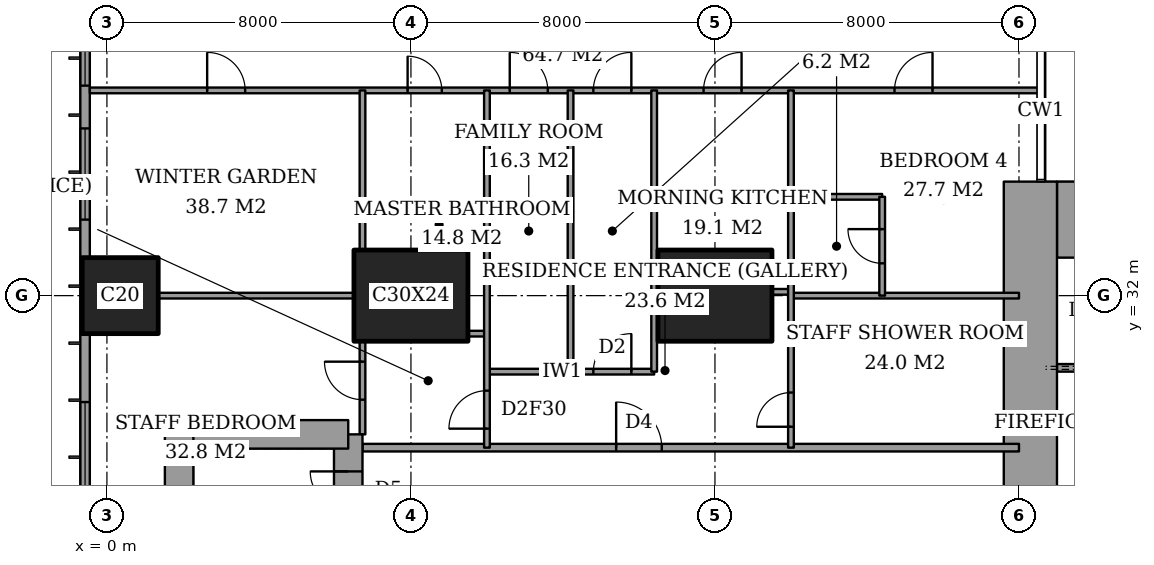
"""IFC4 building model, lengths in metres.
Left out: names, types, materials, properties, quantities, classifications, styles, units other than length and angle.
Written with IfcOpenShell. Run it as: python <this file> out.ifc"""

import sys

from ifc_helpers import new_model, si_unit, direction, frame, frame_2d, origin, origin_2d, place, context, subcontext, project, spatial, rectangle, extrude, element, fill, save


model = new_model("IFC4")
c1 = context("Model", 3, precision=1e-05, world=origin(), true_north=direction((0.0, 1.0)))
c2 = subcontext(c1, "Body", "Model", "MODEL_VIEW")
j1 = project(units=[si_unit("LENGTHUNIT", "METRE"), si_unit("PLANEANGLEUNIT", "RADIAN")], contexts=[c1])
p1 = place(None, origin())
s1 = spatial("IfcSite", under=j1, at=p1, CompositionType="ELEMENT")
p2 = place(p1, origin())
s2 = spatial("IfcBuilding", under=s1, at=p2, CompositionType="ELEMENT")
p3 = place(p2, frame((0.0, 0.0, 103.4)))
s3 = spatial("IfcBuildingStorey", under=s2, at=p3, CompositionType="ELEMENT", Elevation=103.4)
p4 = place(p3, frame((0.35, 32.0, 0.0), z_axis=(0.0, 0.0, 1.0), x_axis=(1.0, 0.0, 0.0)))
e1 = element("IfcColumn", 1, at=p4, inside=s3, PredefinedType="COLUMN", context=c2, shape_type="SweptSolid", body=[
    extrude(rectangle(XDim=2.0, YDim=2.0, at=origin_2d()), origin(), (0.0, 0.0, 1.0), 3.6),
])
for number, where, z_axis, x_axis in (
    (2, (8.0, 32.0, 0.0), (0.0, 0.0, 1.0), (1.0, 0.0, 0.0)),
    (3, (16.0, 32.0, 0.0), (0.0, 0.0, 1.0), (1.0, 0.0, 0.0)),
):
    element("IfcColumn", number, at=place(p3, frame(where, z_axis=z_axis, x_axis=x_axis)), inside=s3, PredefinedType="COLUMN", context=c2, shape_type="SweptSolid", body=[
        extrude(rectangle(XDim=3.0, YDim=2.4, at=origin_2d()), origin(), (0.0, 0.0, 1.0), 3.6),
    ])
p5 = place(p3, frame((25.0, 34.0, 0.0), z_axis=(0.0, 0.0, 1.0), x_axis=(1.0, 0.0, 0.0)))
e4 = element("IfcWall", 4, at=p5, inside=s3, PredefinedType="SHEAR", context=c2, shape_type="SweptSolid", body=[
    extrude(rectangle(XDim=3.15, YDim=2.0, at=frame_2d((1.575, 0.0))), origin(), (0.0, 0.0, 1.0), 3.6),
])
p6 = place(p3, frame((24.3, 23.15, 0.0), z_axis=(0.0, 0.0, 1.0), x_axis=(0.0, 1.0, 0.0)))
e5 = element("IfcWall", 5, at=p6, inside=s3, PredefinedType="SHEAR", context=c2, shape_type="SweptSolid", body=[
    extrude(rectangle(XDim=11.85, YDim=1.4, at=frame_2d((5.925, 0.0))), origin(), (0.0, 0.0, 1.0), 3.6),
])
p7 = place(p6, frame((0.75, 0.0, 0.0)))
e6 = element("IfcOpeningElement", 6, at=p7, cuts=e5, PredefinedType="OPENING", context=c2, shape_type="SweptSolid", body=[
    extrude(rectangle(XDim=1.8, YDim=2.4, at=frame_2d((0.9, 1.2))), frame((0.0, 0.71, 0.0), z_axis=(0.0, -1.0, 0.0), x_axis=(1.0, 0.0, 0.0)), (0.0, 0.0, 1.0), 1.42),
])
p8 = place(p3, frame((6.35, 19.65, 0.0), z_axis=(0.0, 0.0, 1.0), x_axis=(0.0, 1.0, 0.0)))
e7 = element("IfcWall", 7, at=p8, inside=s3, PredefinedType="SHEAR", context=c2, shape_type="SweptSolid", body=[
    extrude(rectangle(XDim=8.7, YDim=0.75, at=frame_2d((4.35, 0.0))), origin(), (0.0, 0.0, 1.0), 3.6),
])
p9 = place(p8, frame((6.725, 0.0, 0.0)))
e8 = element("IfcOpeningElement", 8, at=p9, cuts=e7, PredefinedType="OPENING", context=c2, shape_type="SweptSolid", body=[
    extrude(rectangle(XDim=1.0, YDim=2.1, at=frame_2d((0.5, 1.05))), frame((0.0, 0.385, 0.0), z_axis=(0.0, -1.0, 0.0), x_axis=(1.0, 0.0, 0.0)), (0.0, 0.0, 1.0), 0.77),
])
p10 = place(p3, frame((6.35, 28.35, 0.0), z_axis=(0.0, 0.0, 1.0), x_axis=(-1.0, 0.0, 0.0)))
e9 = element("IfcWall", 9, at=p10, inside=s3, PredefinedType="SHEAR", context=c2, shape_type="SweptSolid", body=[
    extrude(rectangle(XDim=4.45, YDim=0.75, at=frame_2d((2.225, 0.0))), origin(), (0.0, 0.0, 1.0), 3.6),
])
p11 = place(p3, frame((1.9, 28.35, 0.0), z_axis=(0.0, 0.0, 1.0), x_axis=(0.0, -1.0, 0.0)))
e10 = element("IfcWall", 10, at=p11, inside=s3, PredefinedType="SHEAR", context=c2, shape_type="SweptSolid", body=[
    extrude(rectangle(XDim=8.7, YDim=0.75, at=frame_2d((4.35, 0.0))), origin(), (0.0, 0.0, 1.0), 3.6),
])
p12 = place(p3, frame((-0.575, 44.825, 0.0), z_axis=(0.0, 0.0, 1.0), x_axis=(0.0, -1.0, 0.0)))
e11 = element("IfcWall", 11, at=p12, inside=s3, PredefinedType="SOLIDWALL", context=c2, shape_type="SweptSolid", body=[
    extrude(rectangle(XDim=41.65, YDim=0.25, at=frame_2d((20.825, 0.0))), origin(), (0.0, 0.0, 1.0), 3.6),
])
p13 = place(p12, frame((0.775, 0.0, 0.4)))
e12 = element("IfcOpeningElement", 12, at=p13, cuts=e11, PredefinedType="OPENING", context=c2, shape_type="SweptSolid", body=[
    extrude(rectangle(XDim=2.4, YDim=2.2, at=frame_2d((1.2, 1.1))), frame((0.0, 0.135, 0.0), z_axis=(0.0, -1.0, 0.0), x_axis=(1.0, 0.0, 0.0)), (0.0, 0.0, 1.0), 0.27),
])
p14 = place(p12, frame((6.1, 0.0, 0.4)))
e13 = element("IfcOpeningElement", 13, at=p14, cuts=e11, PredefinedType="OPENING", context=c2, shape_type="SweptSolid", body=[
    extrude(rectangle(XDim=1.2, YDim=2.2, at=frame_2d((0.6, 1.1))), frame((0.0, 0.135, 0.0), z_axis=(0.0, -1.0, 0.0), x_axis=(1.0, 0.0, 0.0)), (0.0, 0.0, 1.0), 0.27),
])
p15 = place(p12, frame((8.425, 0.0, 0.4)))
e14 = element("IfcOpeningElement", 14, at=p15, cuts=e11, PredefinedType="OPENING", context=c2, shape_type="SweptSolid", body=[
    extrude(rectangle(XDim=2.4, YDim=2.2, at=frame_2d((1.2, 1.1))), frame((0.0, 0.135, 0.0), z_axis=(0.0, -1.0, 0.0), x_axis=(1.0, 0.0, 0.0)), (0.0, 0.0, 1.0), 0.27),
])
p16 = place(p12, frame((15.625, 0.0, 0.4)))
e15 = element("IfcOpeningElement", 15, at=p16, cuts=e11, PredefinedType="OPENING", context=c2, shape_type="SweptSolid", body=[
    extrude(rectangle(XDim=2.4, YDim=2.2, at=frame_2d((1.2, 1.1))), frame((0.0, 0.135, 0.0), z_axis=(0.0, -1.0, 0.0), x_axis=(1.0, 0.0, 0.0)), (0.0, 0.0, 1.0), 0.27),
])
p17 = place(p12, frame((23.625, 0.0, 0.4)))
e16 = element("IfcOpeningElement", 16, at=p17, cuts=e11, PredefinedType="OPENING", context=c2, shape_type="SweptSolid", body=[
    extrude(rectangle(XDim=2.4, YDim=2.2, at=frame_2d((1.2, 1.1))), frame((0.0, 0.135, 0.0), z_axis=(0.0, -1.0, 0.0), x_axis=(1.0, 0.0, 0.0)), (0.0, 0.0, 1.0), 0.27),
])
p18 = place(p12, frame((30.725, 0.0, 0.4)))
e17 = element("IfcOpeningElement", 17, at=p18, cuts=e11, PredefinedType="OPENING", context=c2, shape_type="SweptSolid", body=[
    extrude(rectangle(XDim=2.4, YDim=2.2, at=frame_2d((1.2, 1.1))), frame((0.0, 0.135, 0.0), z_axis=(0.0, -1.0, 0.0), x_axis=(1.0, 0.0, 0.0)), (0.0, 0.0, 1.0), 0.27),
])
p19 = place(p12, frame((34.325, 0.0, 0.4)))
e18 = element("IfcOpeningElement", 18, at=p19, cuts=e11, PredefinedType="OPENING", context=c2, shape_type="SweptSolid", body=[
    extrude(rectangle(XDim=1.2, YDim=2.2, at=frame_2d((0.6, 1.1))), frame((0.0, 0.135, 0.0), z_axis=(0.0, -1.0, 0.0), x_axis=(1.0, 0.0, 0.0)), (0.0, 0.0, 1.0), 0.27),
])
p20 = place(p12, frame((38.475, 0.0, 0.4)))
e19 = element("IfcOpeningElement", 19, at=p20, cuts=e11, PredefinedType="OPENING", context=c2, shape_type="SweptSolid", body=[
    extrude(rectangle(XDim=2.4, YDim=2.2, at=frame_2d((1.2, 1.1))), frame((0.0, 0.135, 0.0), z_axis=(0.0, -1.0, 0.0), x_axis=(1.0, 0.0, 0.0)), (0.0, 0.0, 1.0), 0.27),
])
p21 = place(p3, frame((6.725, 28.0, 0.0), z_axis=(0.0, 0.0, 1.0), x_axis=(1.0, 0.0, 0.0)))
e20 = element("IfcWall", 20, at=p21, inside=s3, PredefinedType="PARTITIONING", context=c2, shape_type="SweptSolid", body=[
    extrude(rectangle(XDim=17.275, YDim=0.2, at=frame_2d((8.637, 0.0))), origin(), (0.0, 0.0, 1.0), 3.35),
])
p22 = place(p21, frame((6.675, 0.0, 0.0)))
e21 = element("IfcOpeningElement", 21, at=p22, cuts=e20, PredefinedType="OPENING", context=c2, shape_type="SweptSolid", body=[
    extrude(rectangle(XDim=1.2, YDim=2.4, at=frame_2d((0.6, 1.2))), frame((0.0, 0.11, 0.0), z_axis=(0.0, -1.0, 0.0), x_axis=(1.0, 0.0, 0.0)), (0.0, 0.0, 1.0), 0.22),
])
p23 = place(p3, frame((10.0, 30.0, 0.0), z_axis=(0.0, 0.0, 1.0), x_axis=(1.0, 0.0, 0.0)))
e22 = element("IfcWall", 22, at=p23, inside=s3, PredefinedType="PARTITIONING", context=c2, shape_type="SweptSolid", body=[
    extrude(rectangle(XDim=4.4, YDim=0.15, at=frame_2d((2.2, 0.0))), origin(), (0.0, 0.0, 1.0), 3.35),
])
p24 = place(p23, frame((2.8, 0.0, 0.0)))
e23 = element("IfcOpeningElement", 23, at=p24, cuts=e22, PredefinedType="OPENING", context=c2, shape_type="SweptSolid", body=[
    extrude(rectangle(XDim=1.0, YDim=2.1, at=frame_2d((0.5, 1.05))), frame((0.0, 0.085, 0.0), z_axis=(0.0, -1.0, 0.0), x_axis=(1.0, 0.0, 0.0)), (0.0, 0.0, 1.0), 0.17),
])
p25 = place(p3, frame((9.5, 31.0, 0.0), z_axis=(0.0, 0.0, 1.0), x_axis=(1.0, 0.0, 0.0)))
e24 = element("IfcWall", 24, at=p25, inside=s3, PredefinedType="PARTITIONING", context=c2, shape_type="SweptSolid", body=[
    extrude(rectangle(XDim=0.5, YDim=0.15, at=frame_2d((0.25, 0.0))), origin(), (0.0, 0.0, 1.0), 3.35),
])
p26 = place(p3, frame((1.35, 32.0, 0.0), z_axis=(0.0, 0.0, 1.0), x_axis=(1.0, 0.0, 0.0)))
e25 = element("IfcWall", 25, at=p26, inside=s3, PredefinedType="PARTITIONING", context=c2, shape_type="SweptSolid", body=[
    extrude(rectangle(XDim=5.15, YDim=0.15, at=frame_2d((2.575, 0.0))), origin(), (0.0, 0.0, 1.0), 2.634),
])
p27 = place(p3, frame((18.0, 32.0, 0.0), z_axis=(0.0, 0.0, 1.0), x_axis=(1.0, 0.0, 0.0)))
e26 = element("IfcWall", 26, at=p27, inside=s3, PredefinedType="PARTITIONING", context=c2, shape_type="SweptSolid", body=[
    extrude(rectangle(XDim=6.0, YDim=0.15, at=frame_2d((3.0, 0.0))), origin(), (0.0, 0.0, 1.0), 2.634),
])
p28 = place(p3, frame((17.5, 32.1, 0.0), z_axis=(0.0, 0.0, 1.0), x_axis=(1.0, 0.0, 0.0)))
e27 = element("IfcWall", 27, at=p28, inside=s3, PredefinedType="PARTITIONING", context=c2, shape_type="SweptSolid", body=[
    extrude(rectangle(XDim=0.5, YDim=0.15, at=frame_2d((0.25, 0.0))), origin(), (0.0, 0.0, 1.0), 2.634),
])
p29 = place(p3, frame((18.0, 34.6, 0.0), z_axis=(0.0, 0.0, 1.0), x_axis=(1.0, 0.0, 0.0)))
e28 = element("IfcWall", 28, at=p29, inside=s3, PredefinedType="PARTITIONING", context=c2, shape_type="SweptSolid", body=[
    extrude(rectangle(XDim=2.4, YDim=0.15, at=frame_2d((1.2, 0.0))), origin(), (0.0, 0.0, 1.0), 3.35),
])
p30 = place(p3, frame((-0.45, 37.4, 0.0), z_axis=(0.0, 0.0, 1.0), x_axis=(1.0, 0.0, 0.0)))
e29 = element("IfcWall", 29, at=p30, inside=s3, PredefinedType="PARTITIONING", context=c2, shape_type="SweptSolid", body=[
    extrude(rectangle(XDim=25.011, YDim=0.15, at=frame_2d((12.505, 0.0))), origin(), (0.0, 0.0, 1.0), 3.35),
])
p31 = place(p30, frame((13.25, 0.0, 0.0)))
e30 = element("IfcOpeningElement", 30, at=p31, cuts=e29, PredefinedType="OPENING", context=c2, shape_type="SweptSolid", body=[
    extrude(rectangle(XDim=1.0, YDim=2.1, at=frame_2d((0.5, 1.05))), frame((0.0, 0.085, 0.0), z_axis=(0.0, -1.0, 0.0), x_axis=(1.0, 0.0, 0.0)), (0.0, 0.0, 1.0), 0.17),
])
p32 = place(p30, frame((3.087, 0.0, 0.0)))
e31 = element("IfcOpeningElement", 31, at=p32, cuts=e29, PredefinedType="OPENING", context=c2, shape_type="SweptSolid", body=[
    extrude(rectangle(XDim=1.0, YDim=2.1, at=frame_2d((0.5, 1.05))), frame((0.0, 0.085, 0.0), z_axis=(0.0, -1.0, 0.0), x_axis=(1.0, 0.0, 0.0)), (0.0, 0.0, 1.0), 0.17),
])
p33 = place(p30, frame((8.363, 0.0, 0.0)))
e32 = element("IfcOpeningElement", 32, at=p33, cuts=e29, PredefinedType="OPENING", context=c2, shape_type="SweptSolid", body=[
    extrude(rectangle(XDim=0.9, YDim=2.1, at=frame_2d((0.45, 1.05))), frame((0.0, 0.085, 0.0), z_axis=(0.0, -1.0, 0.0), x_axis=(1.0, 0.0, 0.0)), (0.0, 0.0, 1.0), 0.17),
])
p34 = place(p30, frame((11.05, 0.0, 0.0)))
e33 = element("IfcOpeningElement", 33, at=p34, cuts=e29, PredefinedType="OPENING", context=c2, shape_type="SweptSolid", body=[
    extrude(rectangle(XDim=1.0, YDim=2.1, at=frame_2d((0.5, 1.05))), frame((0.0, 0.085, 0.0), z_axis=(0.0, -1.0, 0.0), x_axis=(1.0, 0.0, 0.0)), (0.0, 0.0, 1.0), 0.17),
])
p35 = place(p30, frame((16.15, 0.0, 0.0)))
e34 = element("IfcOpeningElement", 34, at=p35, cuts=e29, PredefinedType="OPENING", context=c2, shape_type="SweptSolid", body=[
    extrude(rectangle(XDim=1.0, YDim=2.1, at=frame_2d((0.5, 1.05))), frame((0.0, 0.085, 0.0), z_axis=(0.0, -1.0, 0.0), x_axis=(1.0, 0.0, 0.0)), (0.0, 0.0, 1.0), 0.17),
])
p36 = place(p30, frame((21.175, 0.0, 0.0)))
e35 = element("IfcOpeningElement", 35, at=p36, cuts=e29, PredefinedType="OPENING", context=c2, shape_type="SweptSolid", body=[
    extrude(rectangle(XDim=1.0, YDim=2.1, at=frame_2d((0.5, 1.05))), frame((0.0, 0.085, 0.0), z_axis=(0.0, -1.0, 0.0), x_axis=(1.0, 0.0, 0.0)), (0.0, 0.0, 1.0), 0.17),
])
p37 = place(p3, frame((6.725, 28.35, 0.0), z_axis=(0.0, 0.0, 1.0), x_axis=(0.0, 1.0, 0.0)))
e36 = element("IfcWall", 36, at=p37, inside=s3, PredefinedType="PARTITIONING", context=c2, shape_type="SweptSolid", body=[
    extrude(rectangle(XDim=2.45, YDim=0.15, at=frame_2d((1.225, 0.0))), origin(), (0.0, 0.0, 1.0), 3.35),
])
p38 = place(p37, frame((0.913, 0.0, 0.0)))
e37 = element("IfcOpeningElement", 37, at=p38, cuts=e36, PredefinedType="OPENING", context=c2, shape_type="SweptSolid", body=[
    extrude(rectangle(XDim=1.0, YDim=2.1, at=frame_2d((0.5, 1.05))), frame((0.0, 0.085, 0.0), z_axis=(0.0, -1.0, 0.0), x_axis=(1.0, 0.0, 0.0)), (0.0, 0.0, 1.0), 0.17),
])
p39 = place(p3, frame((6.725, 33.2, 0.0), z_axis=(0.0, 0.0, 1.0), x_axis=(0.0, 1.0, 0.0)))
e38 = element("IfcWall", 38, at=p39, inside=s3, PredefinedType="PARTITIONING", context=c2, shape_type="SweptSolid", body=[
    extrude(rectangle(XDim=4.2, YDim=0.15, at=frame_2d((2.1, 0.0))), origin(), (0.0, 0.0, 1.0), 3.35),
])
p40 = place(p3, frame((10.0, 28.0, 0.0), z_axis=(0.0, 0.0, 1.0), x_axis=(0.0, 1.0, 0.0)))
e39 = element("IfcWall", 39, at=p40, inside=s3, PredefinedType="PARTITIONING", context=c2, shape_type="SweptSolid", body=[
    extrude(rectangle(XDim=9.4, YDim=0.15, at=frame_2d((4.7, 0.0))), origin(), (0.0, 0.0, 1.0), 3.35),
])
p41 = place(p40, frame((0.5, 0.0, 0.0)))
e40 = element("IfcOpeningElement", 40, at=p41, cuts=e39, PredefinedType="OPENING", context=c2, shape_type="SweptSolid", body=[
    extrude(rectangle(XDim=1.0, YDim=2.1, at=frame_2d((0.5, 1.05))), frame((0.0, 0.085, 0.0), z_axis=(0.0, -1.0, 0.0), x_axis=(1.0, 0.0, 0.0)), (0.0, 0.0, 1.0), 0.17),
])
for number, where, z_axis, x_axis in (
    (41, (12.2, 30.0, 0.0), (0.0, 0.0, 1.0), (0.0, 1.0, 0.0)),
    (42, (14.4, 30.0, 0.0), (0.0, 0.0, 1.0), (0.0, 1.0, 0.0)),
):
    element("IfcWall", number, at=place(p3, frame(where, z_axis=z_axis, x_axis=x_axis)), inside=s3, PredefinedType="PARTITIONING", context=c2, shape_type="SweptSolid", body=[
        extrude(rectangle(XDim=7.4, YDim=0.15, at=frame_2d((3.7, 0.0))), origin(), (0.0, 0.0, 1.0), 3.35),
    ])
p42 = place(p3, frame((18.0, 28.0, 0.0), z_axis=(0.0, 0.0, 1.0), x_axis=(0.0, 1.0, 0.0)))
e43 = element("IfcWall", 43, at=p42, inside=s3, PredefinedType="PARTITIONING", context=c2, shape_type="SweptSolid", body=[
    extrude(rectangle(XDim=9.4, YDim=0.15, at=frame_2d((4.7, 0.0))), origin(), (0.0, 0.0, 1.0), 3.35),
])
p43 = place(p42, frame((0.55, 0.0, 0.0)))
e44 = element("IfcOpeningElement", 44, at=p43, cuts=e43, PredefinedType="OPENING", context=c2, shape_type="SweptSolid", body=[
    extrude(rectangle(XDim=0.9, YDim=2.1, at=frame_2d((0.45, 1.05))), frame((0.0, 0.085, 0.0), z_axis=(0.0, -1.0, 0.0), x_axis=(1.0, 0.0, 0.0)), (0.0, 0.0, 1.0), 0.17),
])
p44 = place(p3, frame((20.4, 32.0, 0.0), z_axis=(0.0, 0.0, 1.0), x_axis=(0.0, 1.0, 0.0)))
e45 = element("IfcWall", 45, at=p44, inside=s3, PredefinedType="PARTITIONING", context=c2, shape_type="SweptSolid", body=[
    extrude(rectangle(XDim=2.6, YDim=0.15, at=frame_2d((1.3, 0.0))), origin(), (0.0, 0.0, 1.0), 3.35),
])
p45 = place(p44, frame((0.85, 0.0, 0.0)))
e46 = element("IfcOpeningElement", 46, at=p45, cuts=e45, PredefinedType="OPENING", context=c2, shape_type="SweptSolid", body=[
    extrude(rectangle(XDim=0.9, YDim=2.1, at=frame_2d((0.45, 1.05))), frame((0.0, 0.085, 0.0), z_axis=(0.0, -1.0, 0.0), x_axis=(1.0, 0.0, 0.0)), (0.0, 0.0, 1.0), 0.17),
])
p46 = place(p3, frame((25.0, 30.1, 0.0), z_axis=(0.0, 0.0, 1.0), x_axis=(1.0, 0.0, 0.0)))
e47 = element("IfcWall", 47, at=p46, inside=s3, PredefinedType="PARTITIONING", context=c2, shape_type="SweptSolid", body=[
    extrude(rectangle(XDim=12.7, YDim=0.2, at=frame_2d((6.35, 0.0))), origin(), (0.0, 0.0, 1.0), 3.6),
])
p47 = place(p46, frame((0.9, 0.0, 0.0)))
e48 = element("IfcOpeningElement", 48, at=p47, cuts=e47, PredefinedType="OPENING", context=c2, shape_type="SweptSolid", body=[
    extrude(rectangle(XDim=1.2, YDim=2.1, at=frame_2d((0.6, 1.05))), frame((0.0, 0.11, 0.0), z_axis=(0.0, -1.0, 0.0), x_axis=(1.0, 0.0, 0.0)), (0.0, 0.0, 1.0), 0.22),
])
p48 = place(p14, origin())
e49 = element("IfcWindow", 49, at=p48, inside=s3, PartitioningType="SINGLE_PANEL", PredefinedType="WINDOW", context=c2, shape_type="SweptSolid", body=[
    extrude(rectangle(XDim=1.2, YDim=2.2, at=frame_2d((0.6, 1.1))), frame((0.0, 0.03, 0.0), z_axis=(0.0, -1.0, 0.0), x_axis=(1.0, 0.0, 0.0)), (0.0, 0.0, 1.0), 0.06),
])
fill(e13, e49)
p49 = place(p15, origin())
e50 = element("IfcWindow", 50, at=p49, inside=s3, PartitioningType="SINGLE_PANEL", PredefinedType="WINDOW", context=c2, shape_type="SweptSolid", body=[
    extrude(rectangle(XDim=2.4, YDim=2.2, at=frame_2d((1.2, 1.1))), frame((0.0, 0.03, 0.0), z_axis=(0.0, -1.0, 0.0), x_axis=(1.0, 0.0, 0.0)), (0.0, 0.0, 1.0), 0.06),
])
fill(e14, e50)
p50 = place(p16, origin())
e51 = element("IfcWindow", 51, at=p50, inside=s3, PartitioningType="SINGLE_PANEL", PredefinedType="WINDOW", context=c2, shape_type="SweptSolid", body=[
    extrude(rectangle(XDim=2.4, YDim=2.2, at=frame_2d((1.2, 1.1))), frame((0.0, 0.03, 0.0), z_axis=(0.0, -1.0, 0.0), x_axis=(1.0, 0.0, 0.0)), (0.0, 0.0, 1.0), 0.06),
])
fill(e15, e51)
p51 = place(p31, origin())
e52 = element("IfcDoor", 52, at=p51, inside=s3, OperationType="SINGLE_SWING_LEFT", PredefinedType="DOOR", context=c2, shape_type="SweptSolid", body=[
    extrude(rectangle(XDim=1.0, YDim=2.1, at=frame_2d((0.5, 1.05))), frame((0.0, 0.025, 0.0), z_axis=(0.0, -1.0, 0.0), x_axis=(1.0, 0.0, 0.0)), (0.0, 0.0, 1.0), 0.05),
])
fill(e30, e52)
p52 = place(p32, origin())
e53 = element("IfcDoor", 53, at=p52, inside=s3, OperationType="SINGLE_SWING_RIGHT", PredefinedType="DOOR", context=c2, shape_type="SweptSolid", body=[
    extrude(rectangle(XDim=1.0, YDim=2.1, at=frame_2d((0.5, 1.05))), frame((0.0, 0.025, 0.0), z_axis=(0.0, -1.0, 0.0), x_axis=(1.0, 0.0, 0.0)), (0.0, 0.0, 1.0), 0.05),
])
fill(e31, e53)
p53 = place(p38, origin())
e54 = element("IfcDoor", 54, at=p53, inside=s3, OperationType="SINGLE_SWING_LEFT", PredefinedType="DOOR", context=c2, shape_type="SweptSolid", body=[
    extrude(rectangle(XDim=1.0, YDim=2.1, at=frame_2d((0.5, 1.05))), frame((0.0, 0.025, 0.0), z_axis=(0.0, -1.0, 0.0), x_axis=(1.0, 0.0, 0.0)), (0.0, 0.0, 1.0), 0.05),
])
fill(e37, e54)
p54 = place(p33, origin())
e55 = element("IfcDoor", 55, at=p54, inside=s3, OperationType="SINGLE_SWING_RIGHT", PredefinedType="DOOR", context=c2, shape_type="SweptSolid", body=[
    extrude(rectangle(XDim=0.9, YDim=2.1, at=frame_2d((0.45, 1.05))), frame((0.0, 0.025, 0.0), z_axis=(0.0, -1.0, 0.0), x_axis=(1.0, 0.0, 0.0)), (0.0, 0.0, 1.0), 0.05),
])
fill(e32, e55)
p55 = place(p41, origin())
e56 = element("IfcDoor", 56, at=p55, inside=s3, OperationType="SINGLE_SWING_RIGHT", PredefinedType="DOOR", context=c2, shape_type="SweptSolid", body=[
    extrude(rectangle(XDim=1.0, YDim=2.1, at=frame_2d((0.5, 1.05))), frame((0.0, 0.025, 0.0), z_axis=(0.0, -1.0, 0.0), x_axis=(1.0, 0.0, 0.0)), (0.0, 0.0, 1.0), 0.05),
])
fill(e40, e56)
p56 = place(p22, origin())
e57 = element("IfcDoor", 57, at=p56, inside=s3, OperationType="SINGLE_SWING_RIGHT", PredefinedType="DOOR", context=c2, shape_type="SweptSolid", body=[
    extrude(rectangle(XDim=1.2, YDim=2.4, at=frame_2d((0.6, 1.2))), frame((0.0, 0.025, 0.0), z_axis=(0.0, -1.0, 0.0), x_axis=(1.0, 0.0, 0.0)), (0.0, 0.0, 1.0), 0.05),
])
fill(e21, e57)
p57 = place(p34, origin())
e58 = element("IfcDoor", 58, at=p57, inside=s3, OperationType="SINGLE_SWING_RIGHT", PredefinedType="DOOR", context=c2, shape_type="SweptSolid", body=[
    extrude(rectangle(XDim=1.0, YDim=2.1, at=frame_2d((0.5, 1.05))), frame((0.0, 0.025, 0.0), z_axis=(0.0, -1.0, 0.0), x_axis=(1.0, 0.0, 0.0)), (0.0, 0.0, 1.0), 0.05),
])
fill(e33, e58)
p58 = place(p24, origin())
e59 = element("IfcDoor", 59, at=p58, inside=s3, OperationType="SINGLE_SWING_LEFT", PredefinedType="DOOR", context=c2, shape_type="SweptSolid", body=[
    extrude(rectangle(XDim=1.0, YDim=2.1, at=frame_2d((0.5, 1.05))), frame((0.0, 0.025, 0.0), z_axis=(0.0, -1.0, 0.0), x_axis=(1.0, 0.0, 0.0)), (0.0, 0.0, 1.0), 0.05),
])
fill(e23, e59)
p59 = place(p35, origin())
e60 = element("IfcDoor", 60, at=p59, inside=s3, OperationType="SINGLE_SWING_LEFT", PredefinedType="DOOR", context=c2, shape_type="SweptSolid", body=[
    extrude(rectangle(XDim=1.0, YDim=2.1, at=frame_2d((0.5, 1.05))), frame((0.0, 0.025, 0.0), z_axis=(0.0, -1.0, 0.0), x_axis=(1.0, 0.0, 0.0)), (0.0, 0.0, 1.0), 0.05),
])
fill(e34, e60)
p60 = place(p45, origin())
e61 = element("IfcDoor", 61, at=p60, inside=s3, OperationType="SINGLE_SWING_LEFT", PredefinedType="DOOR", context=c2, shape_type="SweptSolid", body=[
    extrude(rectangle(XDim=0.9, YDim=2.1, at=frame_2d((0.45, 1.05))), frame((0.0, 0.025, 0.0), z_axis=(0.0, -1.0, 0.0), x_axis=(1.0, 0.0, 0.0)), (0.0, 0.0, 1.0), 0.05),
])
fill(e46, e61)
p61 = place(p36, origin())
e62 = element("IfcDoor", 62, at=p61, inside=s3, OperationType="SINGLE_SWING_LEFT", PredefinedType="DOOR", context=c2, shape_type="SweptSolid", body=[
    extrude(rectangle(XDim=1.0, YDim=2.1, at=frame_2d((0.5, 1.05))), frame((0.0, 0.025, 0.0), z_axis=(0.0, -1.0, 0.0), x_axis=(1.0, 0.0, 0.0)), (0.0, 0.0, 1.0), 0.05),
])
fill(e35, e62)
p62 = place(p43, origin())
e63 = element("IfcDoor", 63, at=p62, inside=s3, OperationType="SINGLE_SWING_RIGHT", PredefinedType="DOOR", context=c2, shape_type="SweptSolid", body=[
    extrude(rectangle(XDim=0.9, YDim=2.1, at=frame_2d((0.45, 1.05))), frame((0.0, 0.025, 0.0), z_axis=(0.0, -1.0, 0.0), x_axis=(1.0, 0.0, 0.0)), (0.0, 0.0, 1.0), 0.05),
])
fill(e44, e63)
p63 = place(p9, origin())
e64 = element("IfcDoor", 64, at=p63, inside=s3, OperationType="SINGLE_SWING_LEFT", PredefinedType="DOOR", context=c2, shape_type="SweptSolid", body=[
    extrude(rectangle(XDim=1.0, YDim=2.1, at=frame_2d((0.5, 1.05))), frame((0.0, 0.025, 0.0), z_axis=(0.0, -1.0, 0.0), x_axis=(1.0, 0.0, 0.0)), (0.0, 0.0, 1.0), 0.05),
])
fill(e8, e64)
save(model, sys.argv[1])
